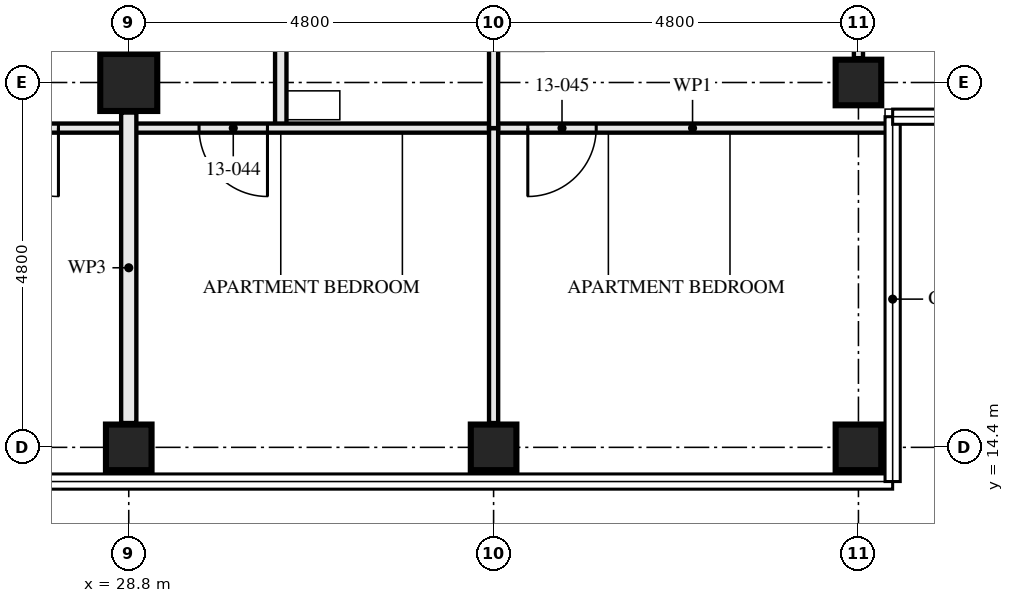
"""IFC4 building model, lengths in metres.
Left out: names, types, materials, properties, quantities, classifications, styles, units other than length and angle.
Written with IfcOpenShell. Run it as: python <this file> out.ifc"""

import sys

from ifc_helpers import new_model, si_unit, direction, frame, frame_2d, origin, origin_2d, place, context, subcontext, project, spatial, rectangle, hollow_rectangle, extrude, element, fill, save


model = new_model("IFC4")
c1 = context("Model", 3, precision=1e-05, world=origin(), true_north=direction((0.0, 1.0)))
c2 = subcontext(c1, "Body", "Model", "MODEL_VIEW")
j1 = project(units=[si_unit("LENGTHUNIT", "METRE"), si_unit("PLANEANGLEUNIT", "RADIAN")], contexts=[c1])
p1 = place(None, origin())
s1 = spatial("IfcSite", under=j1, at=p1, CompositionType="ELEMENT")
p2 = place(p1, origin())
s2 = spatial("IfcBuilding", under=s1, at=p2, CompositionType="ELEMENT")
p3 = place(p2, frame((0.0, 0.0, 51.5)))
s3 = spatial("IfcBuildingStorey", under=s2, at=p3, CompositionType="ELEMENT", Elevation=51.5)
p4 = place(p3, frame((28.8, 14.4, 0.0), z_axis=(0.0, 0.0, 1.0), x_axis=(0.0, 1.0, 0.0)))
e1 = element("IfcColumn", 1, at=p4, inside=s3, PredefinedType="COLUMN", context=c2, shape_type="SweptSolid", body=[
    extrude(hollow_rectangle(XDim=0.6, YDim=0.6, WallThickness=0.08, at=origin_2d()), origin(), (0.0, 0.0, 1.0), 3.5),
])
p5 = place(p3, frame((28.8, 19.2, 0.0), z_axis=(0.0, 0.0, 1.0), x_axis=(1.0, 0.0, 0.0)))
e2 = element("IfcColumn", 2, at=p5, inside=s3, PredefinedType="COLUMN", context=c2, shape_type="SweptSolid", body=[
    extrude(hollow_rectangle(XDim=0.75, YDim=0.75, WallThickness=0.08, at=origin_2d()), origin(), (0.0, 0.0, 1.0), 3.5),
])
p6 = place(p3, frame((33.6, 14.4, 0.0), z_axis=(0.0, 0.0, 1.0), x_axis=(0.0, 1.0, 0.0)))
e3 = element("IfcColumn", 3, at=p6, inside=s3, PredefinedType="COLUMN", context=c2, shape_type="SweptSolid", body=[
    extrude(hollow_rectangle(XDim=0.6, YDim=0.6, WallThickness=0.08, at=origin_2d()), origin(), (0.0, 0.0, 1.0), 3.5),
])
for number, where, z_axis, x_axis in (
    (4, (38.4, 14.4, 0.0), (0.0, 0.0, 1.0), (0.0, 1.0, 0.0)),
    (5, (38.4, 19.2, 0.0), (0.0, 0.0, 1.0), (0.0, 1.0, 0.0)),
):
    element("IfcColumn", number, at=place(p3, frame(where, z_axis=z_axis, x_axis=x_axis)), inside=s3, PredefinedType="COLUMN", context=c2, shape_type="SweptSolid", body=[
        extrude(hollow_rectangle(XDim=0.6, YDim=0.6, WallThickness=0.06, at=origin_2d()), origin(), (0.0, 0.0, 1.0), 3.5),
    ])
p7 = place(p3, frame((24.0, 18.6, 0.0), z_axis=(0.0, 0.0, 1.0), x_axis=(1.0, 0.0, 0.0)))
e6 = element("IfcWall", 6, at=p7, inside=s3, PredefinedType="PARTITIONING", context=c2, shape_type="SweptSolid", body=[
    extrude(rectangle(XDim=4.8, YDim=0.12, at=frame_2d((2.4, 0.0))), origin(), (0.0, 0.0, 1.0), 3.33),
])
p8 = place(p7, frame((2.975, 0.0, 0.0)))
e7 = element("IfcOpeningElement", 7, at=p8, cuts=e6, PredefinedType="OPENING", context=c2, shape_type="SweptSolid", body=[
    extrude(rectangle(XDim=0.9, YDim=2.1, at=frame_2d((0.45, 1.05))), frame((0.0, 0.071, 0.0), z_axis=(0.0, -1.0, 0.0), x_axis=(1.0, 0.0, 0.0)), (0.0, 0.0, 1.0), 0.141),
])
p9 = place(p3, frame((30.8, 18.6, 0.0), z_axis=(0.0, 0.0, 1.0), x_axis=(0.0, 1.0, 0.0)))
e8 = element("IfcWall", 8, at=p9, inside=s3, PredefinedType="PARTITIONING", context=c2, shape_type="SweptSolid", body=[
    extrude(rectangle(XDim=3.0, YDim=0.15, at=frame_2d((1.5, 0.0))), origin(), (0.0, 0.0, 1.0), 2.55),
])
p10 = place(p9, frame((1.05, 0.0, 0.0)))
e9 = element("IfcOpeningElement", 9, at=p10, cuts=e8, PredefinedType="OPENING", context=c2, shape_type="SweptSolid", body=[
    extrude(rectangle(XDim=0.9, YDim=2.1, at=frame_2d((0.45, 1.05))), frame((0.0, 0.085, 0.0), z_axis=(0.0, -1.0, 0.0), x_axis=(1.0, 0.0, 0.0)), (0.0, 0.0, 1.0), 0.171),
])
p11 = place(p3, frame((33.6, 18.6, 0.0), z_axis=(0.0, 0.0, 1.0), x_axis=(0.0, 1.0, 0.0)))
e10 = element("IfcWall", 10, at=p11, inside=s3, PredefinedType="PARTITIONING", context=c2, shape_type="SweptSolid", body=[
    extrude(rectangle(XDim=8.25, YDim=0.12, at=frame_2d((4.125, 0.0))), origin(), (0.0, 0.0, 1.0), 2.55),
])
p12 = place(p11, frame((5.15, 0.0, 0.0)))
e11 = element("IfcOpeningElement", 11, at=p12, cuts=e10, PredefinedType="OPENING", context=c2, shape_type="SweptSolid", body=[
    extrude(rectangle(XDim=0.9, YDim=2.1, at=frame_2d((0.45, 1.05))), frame((0.0, 0.071, 0.0), z_axis=(0.0, -1.0, 0.0), x_axis=(1.0, 0.0, 0.0)), (0.0, 0.0, 1.0), 0.141),
])
p13 = place(p3, frame((28.8, 18.6, 0.0), z_axis=(0.0, 0.0, 1.0), x_axis=(1.0, 0.0, 0.0)))
e12 = element("IfcWall", 12, at=p13, inside=s3, PredefinedType="PARTITIONING", context=c2, shape_type="SweptSolid", body=[
    extrude(rectangle(XDim=4.8, YDim=0.12, at=frame_2d((2.4, 0.0))), origin(), (0.0, 0.0, 1.0), 3.33),
])
p14 = place(p13, frame((0.925, 0.0, 0.0)))
e13 = element("IfcOpeningElement", 13, at=p14, cuts=e12, PredefinedType="OPENING", context=c2, shape_type="SweptSolid", body=[
    extrude(rectangle(XDim=0.9, YDim=2.1, at=frame_2d((0.45, 1.05))), frame((0.0, 0.071, 0.0), z_axis=(0.0, -1.0, 0.0), x_axis=(1.0, 0.0, 0.0)), (0.0, 0.0, 1.0), 0.141),
])
p15 = place(p3, frame((33.6, 18.6, 0.0), z_axis=(0.0, 0.0, 1.0), x_axis=(1.0, 0.0, 0.0)))
e14 = element("IfcWall", 14, at=p15, inside=s3, PredefinedType="PARTITIONING", context=c2, shape_type="SweptSolid", body=[
    extrude(rectangle(XDim=5.235, YDim=0.12, at=frame_2d((2.617, 0.0))), origin(), (0.0, 0.0, 1.0), 2.32),
])
p16 = place(p15, frame((0.45, 0.0, 0.0)))
e15 = element("IfcOpeningElement", 15, at=p16, cuts=e14, PredefinedType="OPENING", context=c2, shape_type="SweptSolid", body=[
    extrude(rectangle(XDim=0.9, YDim=2.1, at=frame_2d((0.45, 1.05))), frame((0.0, 0.071, 0.0), z_axis=(0.0, -1.0, 0.0), x_axis=(1.0, 0.0, 0.0)), (0.0, 0.0, 1.0), 0.141),
])
p17 = place(p3, frame((33.6, 14.72, 0.0), z_axis=(0.0, 0.0, 1.0), x_axis=(0.0, 1.0, 0.0)))
e16 = element("IfcWall", 16, at=p17, inside=s3, PredefinedType="PARTITIONING", context=c2, shape_type="SweptSolid", body=[
    extrude(rectangle(XDim=3.88, YDim=0.12, at=frame_2d((1.94, 0.0))), origin(), (0.0, 0.0, 1.0), 3.33),
])
p18 = place(p3, frame((38.4, 19.52, 0.0), z_axis=(0.0, 0.0, 1.0), x_axis=(0.0, 1.0, 0.0)))
e17 = element("IfcWall", 17, at=p18, inside=s3, PredefinedType="PARTITIONING", context=c2, shape_type="SweptSolid", body=[
    extrude(rectangle(XDim=4.28, YDim=0.12, at=frame_2d((2.14, 0.0))), origin(), (0.0, 0.0, 1.0), 3.33),
])
p19 = place(p18, frame((1.53, 0.0, 0.0)))
e18 = element("IfcOpeningElement", 18, at=p19, cuts=e17, PredefinedType="OPENING", context=c2, shape_type="SweptSolid", body=[
    extrude(rectangle(XDim=0.9, YDim=2.1, at=frame_2d((0.45, 1.05))), frame((0.0, 0.071, 0.0), z_axis=(0.0, -1.0, 0.0), x_axis=(1.0, 0.0, 0.0)), (0.0, 0.0, 1.0), 0.141),
])
p20 = place(p3, frame((28.8, 14.72, 0.0), z_axis=(0.0, 0.0, 1.0), x_axis=(0.0, 1.0, 0.0)))
e19 = element("IfcWall", 19, at=p20, inside=s3, PredefinedType="PARTITIONING", context=c2, shape_type="SweptSolid", body=[
    extrude(rectangle(XDim=4.085, YDim=0.2, at=frame_2d((2.042, 0.0))), origin(), (0.0, 0.0, 1.0), 2.32),
])
p21 = place(p3, frame((28.8, 19.595, 0.0), z_axis=(0.0, 0.0, 1.0), x_axis=(0.0, 1.0, 0.0)))
e20 = element("IfcWall", 20, at=p21, inside=s3, PredefinedType="PARTITIONING", context=c2, shape_type="SweptSolid", body=[
    extrude(rectangle(XDim=4.01, YDim=0.2, at=frame_2d((2.005, 0.0))), origin(), (0.0, 0.0, 1.0), 2.32),
])
p22 = place(p8, frame((0.9, 0.0, 0.0), z_axis=(0.0, 0.0, 1.0), x_axis=(-1.0, 0.0, 0.0)))
e21 = element("IfcDoor", 21, at=p22, inside=s3, OperationType="SINGLE_SWING_RIGHT", PredefinedType="DOOR", context=c2, shape_type="SweptSolid", body=[
    extrude(rectangle(XDim=0.9, YDim=2.1, at=frame_2d((0.45, 1.05))), frame((0.0, 0.022, 0.0), z_axis=(0.0, -1.0, 0.0), x_axis=(1.0, 0.0, 0.0)), (0.0, 0.0, 1.0), 0.044),
])
fill(e7, e21)
p23 = place(p14, frame((0.9, 0.0, 0.0), z_axis=(0.0, 0.0, 1.0), x_axis=(-1.0, 0.0, 0.0)))
e22 = element("IfcDoor", 22, at=p23, inside=s3, OperationType="SINGLE_SWING_RIGHT", PredefinedType="DOOR", context=c2, shape_type="SweptSolid", body=[
    extrude(rectangle(XDim=0.9, YDim=2.1, at=frame_2d((0.45, 1.05))), frame((0.0, 0.022, 0.0), z_axis=(0.0, -1.0, 0.0), x_axis=(1.0, 0.0, 0.0)), (0.0, 0.0, 1.0), 0.044),
])
fill(e13, e22)
p24 = place(p16, frame((0.9, 0.0, 0.0), z_axis=(0.0, 0.0, 1.0), x_axis=(-1.0, 0.0, 0.0)))
e23 = element("IfcDoor", 23, at=p24, inside=s3, OperationType="SINGLE_SWING_LEFT", PredefinedType="DOOR", context=c2, shape_type="SweptSolid", body=[
    extrude(rectangle(XDim=0.9, YDim=2.1, at=frame_2d((0.45, 1.05))), frame((0.0, 0.022, 0.0), z_axis=(0.0, -1.0, 0.0), x_axis=(1.0, 0.0, 0.0)), (0.0, 0.0, 1.0), 0.044),
])
fill(e15, e23)
save(model, sys.argv[1])
